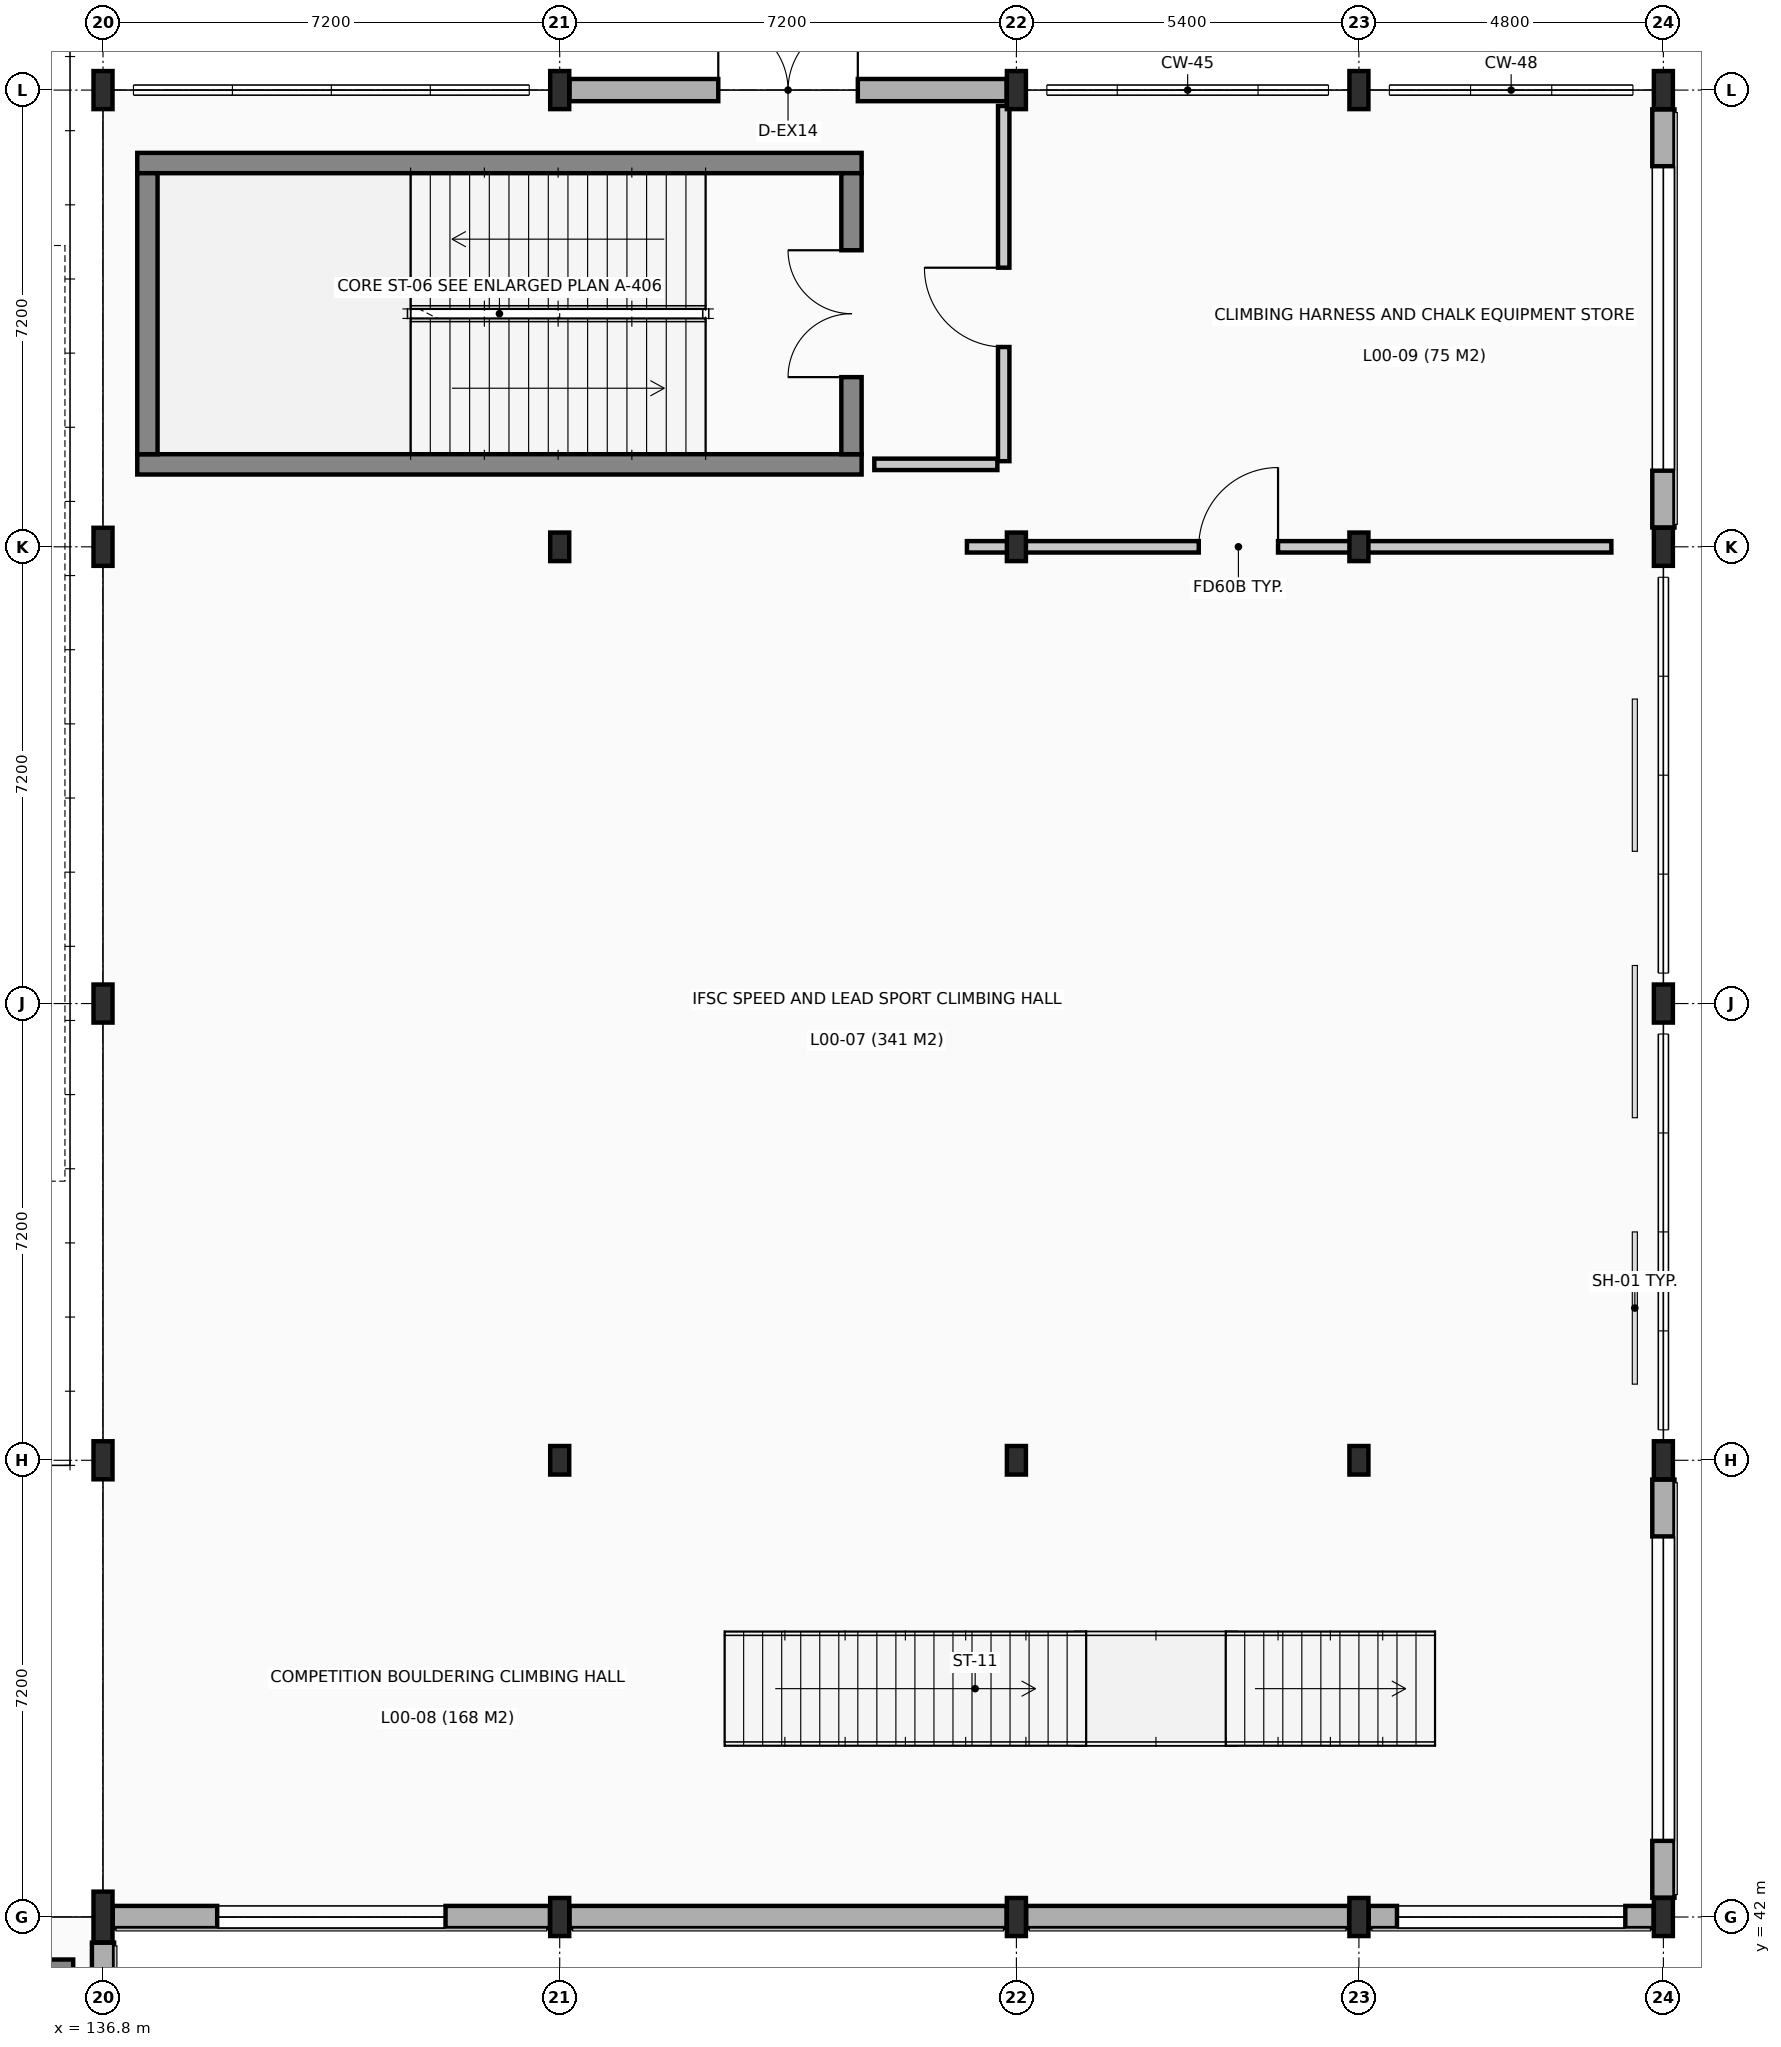
"""IFC4 building model, lengths in metres.
Left out: names, types, materials, properties, quantities, classifications, styles, units other than length and angle.
Written with IfcOpenShell. Run it as: python <this file> out.ifc"""

import sys

from ifc_helpers import new_model, si_unit, direction, frame, frame_2d, origin, origin_2d, place, context, subcontext, project, spatial, rectangle, i_section, extrude, element, fill, save


model = new_model("IFC4")
c1 = context("Model", 3, precision=1e-05, world=origin(), true_north=direction((0.0, 1.0)))
c2 = subcontext(c1, "Body", "Model", "MODEL_VIEW")
j1 = project(units=[si_unit("LENGTHUNIT", "METRE"), si_unit("PLANEANGLEUNIT", "RADIAN")], contexts=[c1])
p1 = place(None, origin())
s1 = spatial("IfcSite", under=j1, at=p1, CompositionType="ELEMENT")
p2 = place(p1, origin())
s2 = spatial("IfcBuilding", under=s1, at=p2, CompositionType="ELEMENT")
p3 = place(p2, origin())
s3 = spatial("IfcBuildingStorey", under=s2, at=p3, CompositionType="ELEMENT", Elevation=0.0)
p4 = place(p3, frame((136.8, 42.0, 0.0), z_axis=(0.0, 0.0, 1.0), x_axis=(1.0, 0.0, 0.0)))
e1 = element("IfcColumn", 1, at=p4, inside=s3, PredefinedType="COLUMN", context=c2, shape_type="SweptSolid", body=[
    extrude(i_section(OverallWidth=0.3, OverallDepth=0.8, WebThickness=0.018, FlangeThickness=0.033, at=origin_2d()), origin(), (0.0, 0.0, 1.0), 4.8),
])
for number, where, z_axis, x_axis in (
    (2, (136.8, 49.2, 0.0), (0.0, 0.0, 1.0), (1.0, 0.0, 0.0)),
    (3, (136.8, 56.4, 0.0), (0.0, 0.0, 1.0), (1.0, 0.0, 0.0)),
    (4, (136.8, 63.6, 0.0), (0.0, 0.0, 1.0), (1.0, 0.0, 0.0)),
    (5, (136.8, 70.8, 0.0), (0.0, 0.0, 1.0), (1.0, 0.0, 0.0)),
    (6, (144.0, 42.0, 0.0), (0.0, 0.0, 1.0), (1.0, 0.0, 0.0)),
):
    element("IfcColumn", number, at=place(p3, frame(where, z_axis=z_axis, x_axis=x_axis)), inside=s3, PredefinedType="COLUMN", context=c2, shape_type="SweptSolid", body=[
        extrude(i_section(OverallWidth=0.3, OverallDepth=0.6, WebThickness=0.015, FlangeThickness=0.03, at=origin_2d()), origin(), (0.0, 0.0, 1.0), 4.8),
    ])
for number, where, z_axis, x_axis in (
    (7, (144.0, 49.2, 0.0), (0.0, 0.0, 1.0), (1.0, 0.0, 0.0)),
    (8, (144.0, 63.6, 0.0), (0.0, 0.0, 1.0), (1.0, 0.0, 0.0)),
):
    element("IfcColumn", number, at=place(p3, frame(where, z_axis=z_axis, x_axis=x_axis)), inside=s3, PredefinedType="COLUMN", context=c2, shape_type="SweptSolid", body=[
        extrude(i_section(OverallWidth=0.3, OverallDepth=0.45, WebThickness=0.014, FlangeThickness=0.026, at=origin_2d()), origin(), (0.0, 0.0, 1.0), 4.8),
    ])
for number, where, z_axis, x_axis in (
    (9, (144.0, 70.8, 0.0), (0.0, 0.0, 1.0), (1.0, 0.0, 0.0)),
    (10, (151.2, 42.0, 0.0), (0.0, 0.0, 1.0), (1.0, 0.0, 0.0)),
):
    element("IfcColumn", number, at=place(p3, frame(where, z_axis=z_axis, x_axis=x_axis)), inside=s3, PredefinedType="COLUMN", context=c2, shape_type="SweptSolid", body=[
        extrude(i_section(OverallWidth=0.3, OverallDepth=0.6, WebThickness=0.015, FlangeThickness=0.03, at=origin_2d()), origin(), (0.0, 0.0, 1.0), 4.8),
    ])
for number, where, z_axis, x_axis in (
    (11, (151.2, 49.2, 0.0), (0.0, 0.0, 1.0), (1.0, 0.0, 0.0)),
    (12, (151.2, 63.6, 0.0), (0.0, 0.0, 1.0), (1.0, 0.0, 0.0)),
):
    element("IfcColumn", number, at=place(p3, frame(where, z_axis=z_axis, x_axis=x_axis)), inside=s3, PredefinedType="COLUMN", context=c2, shape_type="SweptSolid", body=[
        extrude(i_section(OverallWidth=0.3, OverallDepth=0.45, WebThickness=0.014, FlangeThickness=0.026, at=origin_2d()), origin(), (0.0, 0.0, 1.0), 4.8),
    ])
for number, where, z_axis, x_axis in (
    (13, (151.2, 70.8, 0.0), (0.0, 0.0, 1.0), (1.0, 0.0, 0.0)),
    (14, (156.6, 42.0, 0.0), (0.0, 0.0, 1.0), (1.0, 0.0, 0.0)),
):
    element("IfcColumn", number, at=place(p3, frame(where, z_axis=z_axis, x_axis=x_axis)), inside=s3, PredefinedType="COLUMN", context=c2, shape_type="SweptSolid", body=[
        extrude(i_section(OverallWidth=0.3, OverallDepth=0.6, WebThickness=0.015, FlangeThickness=0.03, at=origin_2d()), origin(), (0.0, 0.0, 1.0), 4.8),
    ])
for number, where, z_axis, x_axis in (
    (15, (156.6, 49.2, 0.0), (0.0, 0.0, 1.0), (1.0, 0.0, 0.0)),
    (16, (156.6, 63.6, 0.0), (0.0, 0.0, 1.0), (1.0, 0.0, 0.0)),
):
    element("IfcColumn", number, at=place(p3, frame(where, z_axis=z_axis, x_axis=x_axis)), inside=s3, PredefinedType="COLUMN", context=c2, shape_type="SweptSolid", body=[
        extrude(i_section(OverallWidth=0.3, OverallDepth=0.45, WebThickness=0.014, FlangeThickness=0.026, at=origin_2d()), origin(), (0.0, 0.0, 1.0), 4.8),
    ])
for number, where, z_axis, x_axis in (
    (17, (156.6, 70.8, 0.0), (0.0, 0.0, 1.0), (1.0, 0.0, 0.0)),
    (18, (161.4, 42.0, 0.0), (0.0, 0.0, 1.0), (1.0, 0.0, 0.0)),
    (19, (161.4, 49.2, 0.0), (0.0, 0.0, 1.0), (1.0, 0.0, 0.0)),
    (20, (161.4, 56.4, 0.0), (0.0, 0.0, 1.0), (1.0, 0.0, 0.0)),
    (21, (161.4, 63.6, 0.0), (0.0, 0.0, 1.0), (1.0, 0.0, 0.0)),
    (22, (161.4, 70.8, 0.0), (0.0, 0.0, 1.0), (1.0, 0.0, 0.0)),
):
    element("IfcColumn", number, at=place(p3, frame(where, z_axis=z_axis, x_axis=x_axis)), inside=s3, PredefinedType="COLUMN", context=c2, shape_type="SweptSolid", body=[
        extrude(i_section(OverallWidth=0.3, OverallDepth=0.6, WebThickness=0.015, FlangeThickness=0.03, at=origin_2d()), origin(), (0.0, 0.0, 1.0), 4.8),
    ])
p5 = place(p3, frame((136.8, 35.104, 0.0), z_axis=(0.0, 0.0, 1.0), x_axis=(0.0, 1.0, 0.0)))
e23 = element("IfcWall", 23, at=p5, inside=s3, PredefinedType="SOLIDWALL", context=c2, shape_type="SweptSolid", body=[
    extrude(rectangle(XDim=6.492, YDim=0.35, at=frame_2d((3.246, 0.0))), origin(), (0.0, 0.0, 1.0), 4.065),
])
p6 = place(p5, frame((1.496, 0.0, 1.0)))
e24 = element("IfcOpeningElement", 24, at=p6, cuts=e23, PredefinedType="OPENING", context=c2, shape_type="SweptSolid", body=[
    extrude(rectangle(XDim=3.6, YDim=1.4, at=frame_2d((1.8, 0.7))), frame((0.0, 0.185, 0.0), z_axis=(0.0, -1.0, 0.0), x_axis=(1.0, 0.0, 0.0)), (0.0, 0.0, 1.0), 0.37),
])
p7 = place(p3, frame((136.954, 42.0, 0.0), z_axis=(0.0, 0.0, 1.0), x_axis=(1.0, 0.0, 0.0)))
e25 = element("IfcWall", 25, at=p7, inside=s3, PredefinedType="SOLIDWALL", context=c2, shape_type="SweptSolid", body=[
    extrude(rectangle(XDim=6.892, YDim=0.35, at=frame_2d((3.446, 0.0))), origin(), (0.0, 0.0, 1.0), 4.165),
])
p8 = place(p7, frame((1.646, 0.0, 1.0)))
e26 = element("IfcOpeningElement", 26, at=p8, cuts=e25, PredefinedType="OPENING", context=c2, shape_type="SweptSolid", body=[
    extrude(rectangle(XDim=3.6, YDim=1.4, at=frame_2d((1.8, 0.7))), frame((0.0, 0.185, 0.0), z_axis=(0.0, -1.0, 0.0), x_axis=(1.0, 0.0, 0.0)), (0.0, 0.0, 1.0), 0.37),
])
p9 = place(p3, frame((144.154, 42.0, 0.0), z_axis=(0.0, 0.0, 1.0), x_axis=(1.0, 0.0, 0.0)))
e27 = element("IfcWall", 27, at=p9, inside=s3, PredefinedType="SOLIDWALL", context=c2, shape_type="SweptSolid", body=[
    extrude(rectangle(XDim=6.892, YDim=0.35, at=frame_2d((3.446, 0.0))), origin(), (0.0, 0.0, 1.0), 4.165),
])
p10 = place(p3, frame((144.154, 70.8, 0.0), z_axis=(0.0, 0.0, 1.0), x_axis=(1.0, 0.0, 0.0)))
e28 = element("IfcWall", 28, at=p10, inside=s3, PredefinedType="SOLIDWALL", context=c2, shape_type="SweptSolid", body=[
    extrude(rectangle(XDim=6.892, YDim=0.35, at=frame_2d((3.446, 0.0))), origin(), (0.0, 0.0, 1.0), 4.165),
])
p11 = place(p10, frame((2.346, 0.0, 0.0)))
e29 = element("IfcOpeningElement", 29, at=p11, cuts=e28, PredefinedType="OPENING", context=c2, shape_type="SweptSolid", body=[
    extrude(rectangle(XDim=2.2, YDim=2.4, at=frame_2d((1.1, 1.2))), frame((0.0, 0.185, 0.0), z_axis=(0.0, -1.0, 0.0), x_axis=(1.0, 0.0, 0.0)), (0.0, 0.0, 1.0), 0.37),
])
p12 = place(p3, frame((151.354, 42.0, 0.0), z_axis=(0.0, 0.0, 1.0), x_axis=(1.0, 0.0, 0.0)))
e30 = element("IfcWall", 30, at=p12, inside=s3, PredefinedType="SOLIDWALL", context=c2, shape_type="SweptSolid", body=[
    extrude(rectangle(XDim=5.092, YDim=0.35, at=frame_2d((2.546, 0.0))), origin(), (0.0, 0.0, 1.0), 4.165),
])
p13 = place(p3, frame((156.754, 42.0, 0.0), z_axis=(0.0, 0.0, 1.0), x_axis=(1.0, 0.0, 0.0)))
e31 = element("IfcWall", 31, at=p13, inside=s3, PredefinedType="SOLIDWALL", context=c2, shape_type="SweptSolid", body=[
    extrude(rectangle(XDim=4.492, YDim=0.35, at=frame_2d((2.246, 0.0))), origin(), (0.0, 0.0, 1.0), 4.165),
])
p14 = place(p13, frame((0.446, 0.0, 1.0)))
e32 = element("IfcOpeningElement", 32, at=p14, cuts=e31, PredefinedType="OPENING", context=c2, shape_type="SweptSolid", body=[
    extrude(rectangle(XDim=3.6, YDim=1.4, at=frame_2d((1.8, 0.7))), frame((0.0, 0.185, 0.0), z_axis=(0.0, -1.0, 0.0), x_axis=(1.0, 0.0, 0.0)), (0.0, 0.0, 1.0), 0.37),
])
p15 = place(p3, frame((161.4, 42.304, 0.0), z_axis=(0.0, 0.0, 1.0), x_axis=(0.0, 1.0, 0.0)))
e33 = element("IfcWall", 33, at=p15, inside=s3, PredefinedType="SOLIDWALL", context=c2, shape_type="SweptSolid", body=[
    extrude(rectangle(XDim=6.592, YDim=0.35, at=frame_2d((3.296, 0.0))), origin(), (0.0, 0.0, 1.0), 4.065),
])
p16 = place(p15, frame((0.896, 0.0, 1.0)))
e34 = element("IfcOpeningElement", 34, at=p16, cuts=e33, PredefinedType="OPENING", context=c2, shape_type="SweptSolid", body=[
    extrude(rectangle(XDim=4.8, YDim=1.5, at=frame_2d((2.4, 0.75))), frame((0.0, 0.185, 0.0), z_axis=(0.0, -1.0, 0.0), x_axis=(1.0, 0.0, 0.0)), (0.0, 0.0, 1.0), 0.37),
])
p17 = place(p3, frame((161.4, 63.904, 0.0), z_axis=(0.0, 0.0, 1.0), x_axis=(0.0, 1.0, 0.0)))
e35 = element("IfcWall", 35, at=p17, inside=s3, PredefinedType="SOLIDWALL", context=c2, shape_type="SweptSolid", body=[
    extrude(rectangle(XDim=6.592, YDim=0.35, at=frame_2d((3.296, 0.0))), origin(), (0.0, 0.0, 1.0), 4.165),
])
p18 = place(p17, frame((0.896, 0.0, 1.0)))
e36 = element("IfcOpeningElement", 36, at=p18, cuts=e35, PredefinedType="OPENING", context=c2, shape_type="SweptSolid", body=[
    extrude(rectangle(XDim=4.8, YDim=1.5, at=frame_2d((2.4, 0.75))), frame((0.0, 0.185, 0.0), z_axis=(0.0, -1.0, 0.0), x_axis=(1.0, 0.0, 0.0)), (0.0, 0.0, 1.0), 0.37),
])
for number, where, z_axis, x_axis in (
    (37, (137.34, 64.9, 0.0), (0.0, 0.0, 1.0), (1.0, 0.0, 0.0)),
    (38, (137.34, 69.65, 0.0), (0.0, 0.0, 1.0), (1.0, 0.0, 0.0)),
):
    element("IfcWall", number, at=place(p3, frame(where, z_axis=z_axis, x_axis=x_axis)), inside=s3, PredefinedType="SHEAR", context=c2, shape_type="SweptSolid", body=[
        extrude(rectangle(XDim=11.42, YDim=0.32, at=frame_2d((5.71, 0.0))), origin(), (0.0, 0.0, 1.0), 4.58),
    ])
p19 = place(p3, frame((137.5, 65.06, 0.0), z_axis=(0.0, 0.0, 1.0), x_axis=(0.0, 1.0, 0.0)))
e39 = element("IfcWall", 39, at=p19, inside=s3, PredefinedType="SHEAR", context=c2, shape_type="SweptSolid", body=[
    extrude(rectangle(XDim=4.43, YDim=0.32, at=frame_2d((2.215, 0.0))), origin(), (0.0, 0.0, 1.0), 4.58),
])
p20 = place(p3, frame((148.6, 65.06, 0.0), z_axis=(0.0, 0.0, 1.0), x_axis=(0.0, 1.0, 0.0)))
e40 = element("IfcWall", 40, at=p20, inside=s3, PredefinedType="SHEAR", context=c2, shape_type="SweptSolid", body=[
    extrude(rectangle(XDim=4.43, YDim=0.32, at=frame_2d((2.215, 0.0))), origin(), (0.0, 0.0, 1.0), 4.58),
])
p21 = place(p20, frame((1.215, 0.0, 0.0)))
e41 = element("IfcOpeningElement", 41, at=p21, cuts=e40, PredefinedType="OPENING", context=c2, shape_type="SweptSolid", body=[
    extrude(rectangle(XDim=2.0, YDim=2.15, at=frame_2d((1.0, 1.075))), frame((0.0, 0.17, 0.0), z_axis=(0.0, -1.0, 0.0), x_axis=(1.0, 0.0, 0.0)), (0.0, 0.0, 1.0), 0.34),
])
p22 = place(p3, frame((133.07, 41.2, 0.0), z_axis=(0.0, 0.0, 1.0), x_axis=(1.0, 0.0, 0.0)))
e42 = element("IfcWall", 42, at=p22, inside=s3, PredefinedType="SHEAR", context=c2, shape_type="SweptSolid", body=[
    extrude(rectangle(XDim=3.26, YDim=0.26, at=frame_2d((1.63, 0.0))), origin(), (0.0, 0.0, 1.0), 4.58),
])
p23 = place(p3, frame((150.42, 63.6, 0.0), z_axis=(0.0, 0.0, 1.0), x_axis=(1.0, 0.0, 0.0)))
e43 = element("IfcWall", 43, at=p23, inside=s3, PredefinedType="PARTITIONING", context=c2, shape_type="SweptSolid", body=[
    extrude(rectangle(XDim=10.16, YDim=0.18, at=frame_2d((5.08, 0.0))), origin(), (0.0, 0.0, 1.0), 4.16),
])
p24 = place(p23, frame((3.655, 0.0, 0.0)))
e44 = element("IfcOpeningElement", 44, at=p24, cuts=e43, PredefinedType="OPENING", context=c2, shape_type="SweptSolid", body=[
    extrude(rectangle(XDim=1.25, YDim=2.15, at=frame_2d((0.625, 1.075))), frame((0.0, 0.1, 0.0), z_axis=(0.0, -1.0, 0.0), x_axis=(1.0, 0.0, 0.0)), (0.0, 0.0, 1.0), 0.2),
])
p25 = place(p3, frame((148.96, 64.9, 0.0), z_axis=(0.0, 0.0, 1.0), x_axis=(1.0, 0.0, 0.0)))
e45 = element("IfcWall", 45, at=p25, inside=s3, PredefinedType="PARTITIONING", context=c2, shape_type="SweptSolid", body=[
    extrude(rectangle(XDim=1.94, YDim=0.18, at=frame_2d((0.97, 0.0))), origin(), (0.0, 0.0, 1.0), 4.565),
])
p26 = place(p3, frame((151.0, 64.95, 0.0), z_axis=(0.0, 0.0, 1.0), x_axis=(0.0, 1.0, 0.0)))
e46 = element("IfcWall", 46, at=p26, inside=s3, PredefinedType="PARTITIONING", context=c2, shape_type="SweptSolid", body=[
    extrude(rectangle(XDim=5.6, YDim=0.18, at=frame_2d((2.8, 0.0))), origin(), (0.0, 0.0, 1.0), 4.11),
])
p27 = place(p26, frame((1.8, 0.0, 0.0)))
e47 = element("IfcOpeningElement", 47, at=p27, cuts=e46, PredefinedType="OPENING", context=c2, shape_type="SweptSolid", body=[
    extrude(rectangle(XDim=1.25, YDim=2.15, at=frame_2d((0.625, 1.075))), frame((0.0, 0.1, 0.0), z_axis=(0.0, -1.0, 0.0), x_axis=(1.0, 0.0, 0.0)), (0.0, 0.0, 1.0), 0.2),
])
p28 = place(p8, origin())
e48 = element("IfcWindow", 48, at=p28, inside=s3, PartitioningType="SINGLE_PANEL", PredefinedType="WINDOW", context=c2, shape_type="SweptSolid", body=[
    extrude(rectangle(XDim=3.6, YDim=1.4, at=frame_2d((1.8, 0.7))), frame((0.0, 0.03, 0.0), z_axis=(0.0, -1.0, 0.0), x_axis=(1.0, 0.0, 0.0)), (0.0, 0.0, 1.0), 0.06),
])
fill(e26, e48)
p29 = place(p11, origin())
e49 = element("IfcDoor", 49, at=p29, inside=s3, OperationType="DOUBLE_DOOR_SINGLE_SWING", PredefinedType="DOOR", context=c2, shape_type="SweptSolid", body=[
    extrude(rectangle(XDim=2.2, YDim=2.4, at=frame_2d((1.1, 1.2))), frame((0.0, 0.025, 0.0), z_axis=(0.0, -1.0, 0.0), x_axis=(1.0, 0.0, 0.0)), (0.0, 0.0, 1.0), 0.05),
])
fill(e29, e49)
p30 = place(p14, origin())
e50 = element("IfcWindow", 50, at=p30, inside=s3, PartitioningType="SINGLE_PANEL", PredefinedType="WINDOW", context=c2, shape_type="SweptSolid", body=[
    extrude(rectangle(XDim=3.6, YDim=1.4, at=frame_2d((1.8, 0.7))), frame((0.0, 0.03, 0.0), z_axis=(0.0, -1.0, 0.0), x_axis=(1.0, 0.0, 0.0)), (0.0, 0.0, 1.0), 0.06),
])
fill(e32, e50)
p31 = place(p16, origin())
e51 = element("IfcWindow", 51, at=p31, inside=s3, PartitioningType="SINGLE_PANEL", PredefinedType="WINDOW", context=c2, shape_type="SweptSolid", body=[
    extrude(rectangle(XDim=4.8, YDim=1.5, at=frame_2d((2.4, 0.75))), frame((0.0, 0.03, 0.0), z_axis=(0.0, -1.0, 0.0), x_axis=(1.0, 0.0, 0.0)), (0.0, 0.0, 1.0), 0.06),
])
fill(e34, e51)
p32 = place(p18, origin())
e52 = element("IfcWindow", 52, at=p32, inside=s3, PartitioningType="SINGLE_PANEL", PredefinedType="WINDOW", context=c2, shape_type="SweptSolid", body=[
    extrude(rectangle(XDim=4.8, YDim=1.5, at=frame_2d((2.4, 0.75))), frame((0.0, 0.03, 0.0), z_axis=(0.0, -1.0, 0.0), x_axis=(1.0, 0.0, 0.0)), (0.0, 0.0, 1.0), 0.06),
])
fill(e36, e52)
p33 = place(p21, origin())
e53 = element("IfcDoor", 53, at=p33, inside=s3, OperationType="DOUBLE_DOOR_SINGLE_SWING", PredefinedType="DOOR", context=c2, shape_type="SweptSolid", body=[
    extrude(rectangle(XDim=2.0, YDim=2.15, at=frame_2d((1.0, 1.075))), frame((0.0, 0.025, 0.0), z_axis=(0.0, -1.0, 0.0), x_axis=(1.0, 0.0, 0.0)), (0.0, 0.0, 1.0), 0.05),
])
fill(e41, e53)
p34 = place(p24, origin())
e54 = element("IfcDoor", 54, at=p34, inside=s3, OperationType="SINGLE_SWING_RIGHT", PredefinedType="DOOR", context=c2, shape_type="SweptSolid", body=[
    extrude(rectangle(XDim=1.25, YDim=2.15, at=frame_2d((0.625, 1.075))), frame((0.0, 0.025, 0.0), z_axis=(0.0, -1.0, 0.0), x_axis=(1.0, 0.0, 0.0)), (0.0, 0.0, 1.0), 0.05),
])
fill(e44, e54)
p35 = place(p27, frame((1.25, 0.0, 0.0), z_axis=(0.0, 0.0, 1.0), x_axis=(-1.0, 0.0, 0.0)))
e55 = element("IfcDoor", 55, at=p35, inside=s3, OperationType="SINGLE_SWING_LEFT", PredefinedType="DOOR", context=c2, shape_type="SweptSolid", body=[
    extrude(rectangle(XDim=1.25, YDim=2.15, at=frame_2d((0.625, 1.075))), frame((0.0, 0.025, 0.0), z_axis=(0.0, -1.0, 0.0), x_axis=(1.0, 0.0, 0.0)), (0.0, 0.0, 1.0), 0.05),
])
fill(e47, e55)
save(model, sys.argv[1])
